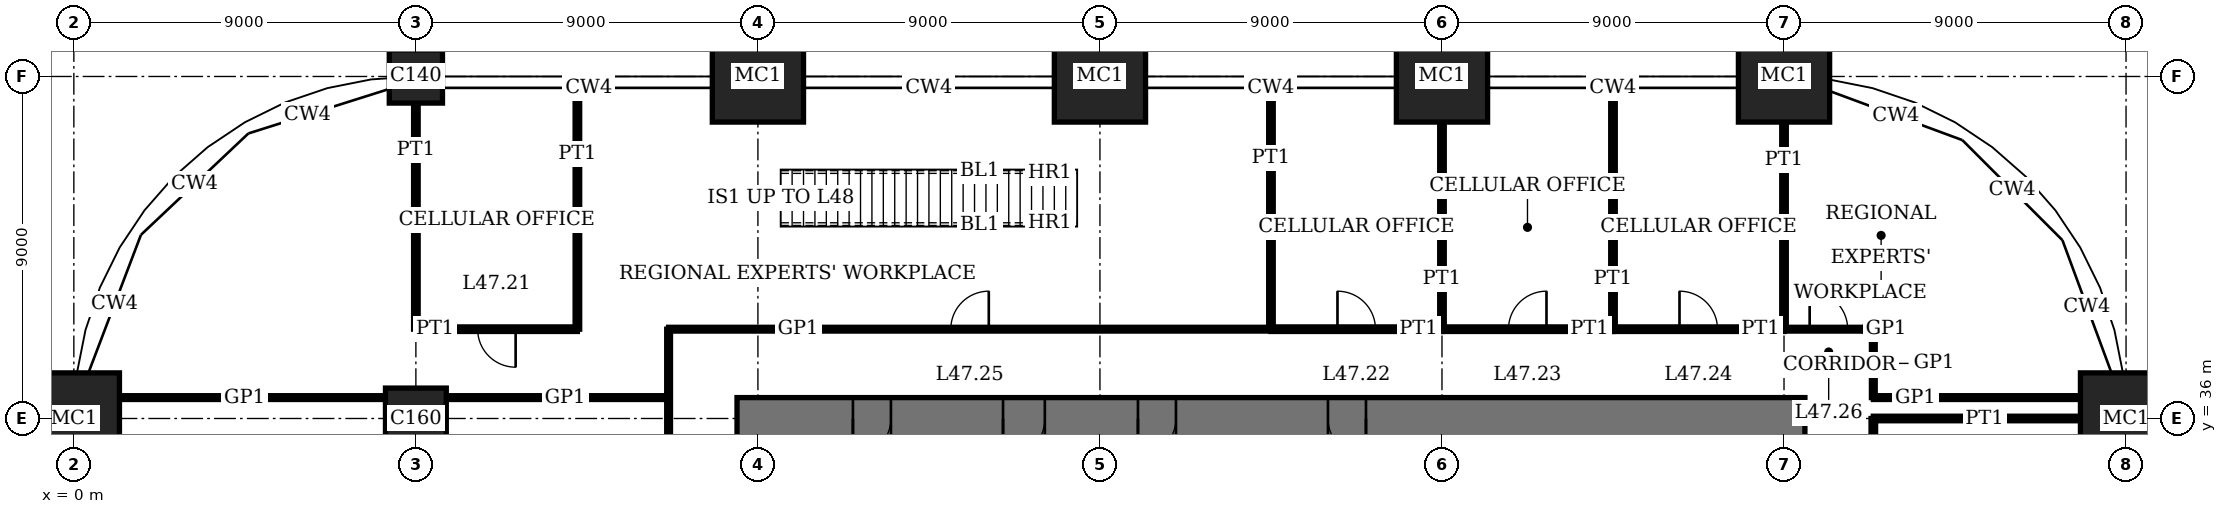
"""IFC4 building model, lengths in metres.
Left out: names, types, materials, properties, quantities, classifications, styles, units other than length and angle.
Written with IfcOpenShell. Run it as: python <this file> out.ifc"""

import sys

from ifc_helpers import new_model, si_unit, direction, frame, frame_2d, origin, origin_2d, place, context, subcontext, project, spatial, rectangle, extrude, element, fill, save


model = new_model("IFC4")
c1 = context("Model", 3, precision=1e-05, world=origin(), true_north=direction((0.0, 1.0)))
c2 = subcontext(c1, "Body", "Model", "MODEL_VIEW")
j1 = project(units=[si_unit("LENGTHUNIT", "METRE"), si_unit("PLANEANGLEUNIT", "RADIAN")], contexts=[c1])
p1 = place(None, origin())
s1 = spatial("IfcSite", under=j1, at=p1, CompositionType="ELEMENT")
p2 = place(p1, origin())
s2 = spatial("IfcBuilding", under=s1, at=p2, CompositionType="ELEMENT")
p3 = place(p2, frame((0.0, 0.0, 194.2)))
s3 = spatial("IfcBuildingStorey", under=s2, at=p3, CompositionType="ELEMENT", Elevation=194.2)
p4 = place(p3, frame((0.0, 36.0, 0.0), z_axis=(0.0, 0.0, 1.0), x_axis=(1.0, 0.0, 0.0)))
e1 = element("IfcColumn", 1, at=p4, inside=s3, PredefinedType="COLUMN", context=c2, shape_type="SweptSolid", body=[
    extrude(rectangle(XDim=2.4, YDim=2.4, at=origin_2d()), origin(), (0.0, 0.0, 1.0), 4.0),
])
p5 = place(p3, frame((9.0, 36.0, 0.0), z_axis=(0.0, 0.0, 1.0), x_axis=(1.0, 0.0, 0.0)))
e2 = element("IfcColumn", 2, at=p5, inside=s3, PredefinedType="COLUMN", context=c2, shape_type="SweptSolid", body=[
    extrude(rectangle(XDim=1.6, YDim=1.6, at=origin_2d()), origin(), (0.0, 0.0, 1.0), 4.0),
])
p6 = place(p3, frame((9.0, 45.0, 0.0), z_axis=(0.0, 0.0, 1.0), x_axis=(1.0, 0.0, 0.0)))
e3 = element("IfcColumn", 3, at=p6, inside=s3, PredefinedType="COLUMN", context=c2, shape_type="SweptSolid", body=[
    extrude(rectangle(XDim=1.4, YDim=1.4, at=origin_2d()), origin(), (0.0, 0.0, 1.0), 4.0),
])
for number, where, z_axis, x_axis in (
    (4, (18.0, 45.0, 0.0), (0.0, 0.0, 1.0), (1.0, 0.0, 0.0)),
    (5, (27.0, 45.0, 0.0), (0.0, 0.0, 1.0), (1.0, 0.0, 0.0)),
    (6, (36.0, 45.0, 0.0), (0.0, 0.0, 1.0), (1.0, 0.0, 0.0)),
    (7, (45.0, 45.0, 0.0), (0.0, 0.0, 1.0), (1.0, 0.0, 0.0)),
    (8, (54.0, 36.0, 0.0), (0.0, 0.0, 1.0), (1.0, 0.0, 0.0)),
):
    element("IfcColumn", number, at=place(p3, frame(where, z_axis=z_axis, x_axis=x_axis)), inside=s3, PredefinedType="COLUMN", context=c2, shape_type="SweptSolid", body=[
        extrude(rectangle(XDim=2.4, YDim=2.4, at=origin_2d()), origin(), (0.0, 0.0, 1.0), 4.0),
    ])
p7 = place(p3, frame((45.55, 36.0, 0.0), z_axis=(0.0, 0.0, 1.0), x_axis=(-1.0, 0.0, 0.0)))
e9 = element("IfcWall", 9, at=p7, inside=s3, PredefinedType="SHEAR", context=c2, shape_type="SweptSolid", body=[
    extrude(rectangle(XDim=28.1, YDim=1.1, at=frame_2d((14.05, 0.0))), origin(), (0.0, 0.0, 1.0), 4.0),
])
p8 = place(p7, frame((11.55, 0.0, 0.0)))
e10 = element("IfcOpeningElement", 10, at=p8, cuts=e9, PredefinedType="OPENING", context=c2, shape_type="SweptSolid", body=[
    extrude(rectangle(XDim=1.0, YDim=2.4, at=frame_2d((0.5, 1.2))), frame((0.0, 0.56, 0.0), z_axis=(0.0, -1.0, 0.0), x_axis=(1.0, 0.0, 0.0)), (0.0, 0.0, 1.0), 1.12),
])
p9 = place(p7, frame((16.55, 0.0, 0.0)))
e11 = element("IfcOpeningElement", 11, at=p9, cuts=e9, PredefinedType="OPENING", context=c2, shape_type="SweptSolid", body=[
    extrude(rectangle(XDim=1.0, YDim=2.4, at=frame_2d((0.5, 1.2))), frame((0.0, 0.56, 0.0), z_axis=(0.0, -1.0, 0.0), x_axis=(1.0, 0.0, 0.0)), (0.0, 0.0, 1.0), 1.12),
])
p10 = place(p7, frame((20.0, 0.0, 0.0)))
e12 = element("IfcOpeningElement", 12, at=p10, cuts=e9, PredefinedType="OPENING", context=c2, shape_type="SweptSolid", body=[
    extrude(rectangle(XDim=1.1, YDim=2.4, at=frame_2d((0.55, 1.2))), frame((0.0, 0.56, 0.0), z_axis=(0.0, -1.0, 0.0), x_axis=(1.0, 0.0, 0.0)), (0.0, 0.0, 1.0), 1.12),
])
p11 = place(p7, frame((24.05, 0.0, 0.0)))
e13 = element("IfcOpeningElement", 13, at=p11, cuts=e9, PredefinedType="OPENING", context=c2, shape_type="SweptSolid", body=[
    extrude(rectangle(XDim=1.0, YDim=2.4, at=frame_2d((0.5, 1.2))), frame((0.0, 0.56, 0.0), z_axis=(0.0, -1.0, 0.0), x_axis=(1.0, 0.0, 0.0)), (0.0, 0.0, 1.0), 1.12),
])
p12 = place(p3, frame((47.35, 36.0, 0.0), z_axis=(0.0, 0.0, 1.0), x_axis=(1.0, 0.0, 0.0)))
e14 = element("IfcWall", 14, at=p12, inside=s3, PredefinedType="PARTITIONING", context=c2, shape_type="SweptSolid", body=[
    extrude(rectangle(XDim=5.45, YDim=0.12, at=frame_2d((2.725, 0.0))), origin(), (0.0, 0.0, 1.0), 3.05),
])
p13 = place(p3, frame((1.2, 36.55, 0.0), z_axis=(0.0, 0.0, 1.0), x_axis=(1.0, 0.0, 0.0)))
e15 = element("IfcWall", 15, at=p13, inside=s3, PredefinedType="PARTITIONING", context=c2, shape_type="SweptSolid", body=[
    extrude(rectangle(XDim=7.0, YDim=0.1, at=frame_2d((3.5, 0.0))), origin(), (0.0, 0.0, 1.0), 3.75),
])
p14 = place(p3, frame((9.8, 36.55, 0.0), z_axis=(0.0, 0.0, 1.0), x_axis=(1.0, 0.0, 0.0)))
e16 = element("IfcWall", 16, at=p14, inside=s3, PredefinedType="PARTITIONING", context=c2, shape_type="SweptSolid", body=[
    extrude(rectangle(XDim=5.85, YDim=0.1, at=frame_2d((2.925, 0.0))), origin(), (0.0, 0.0, 1.0), 3.75),
])
p15 = place(p3, frame((47.35, 36.55, 0.0), z_axis=(0.0, 0.0, 1.0), x_axis=(1.0, 0.0, 0.0)))
e17 = element("IfcWall", 17, at=p15, inside=s3, PredefinedType="PARTITIONING", context=c2, shape_type="SweptSolid", body=[
    extrude(rectangle(XDim=5.45, YDim=0.1, at=frame_2d((2.725, 0.0))), origin(), (0.0, 0.0, 1.0), 3.75),
])
p16 = place(p3, frame((9.0, 38.35, 0.0), z_axis=(0.0, 0.0, 1.0), x_axis=(1.0, 0.0, 0.0)))
e18 = element("IfcWall", 18, at=p16, inside=s3, PredefinedType="PARTITIONING", context=c2, shape_type="SweptSolid", body=[
    extrude(rectangle(XDim=4.25, YDim=0.12, at=frame_2d((2.125, 0.0))), origin(), (0.0, 0.0, 1.0), 3.75),
])
p17 = place(p16, frame((1.625, 0.0, 0.0)))
e19 = element("IfcOpeningElement", 19, at=p17, cuts=e18, PredefinedType="OPENING", context=c2, shape_type="SweptSolid", body=[
    extrude(rectangle(XDim=1.0, YDim=2.4, at=frame_2d((0.5, 1.2))), frame((0.0, 0.07, 0.0), z_axis=(0.0, -1.0, 0.0), x_axis=(1.0, 0.0, 0.0)), (0.0, 0.0, 1.0), 0.14),
])
p18 = place(p3, frame((31.5, 38.35, 0.0), z_axis=(0.0, 0.0, 1.0), x_axis=(1.0, 0.0, 0.0)))
e20 = element("IfcWall", 20, at=p18, inside=s3, PredefinedType="PARTITIONING", context=c2, shape_type="SweptSolid", body=[
    extrude(rectangle(XDim=4.5, YDim=0.12, at=frame_2d((2.25, 0.0))), origin(), (0.0, 0.0, 1.0), 3.75),
])
p19 = place(p18, frame((1.75, 0.0, 0.0)))
e21 = element("IfcOpeningElement", 21, at=p19, cuts=e20, PredefinedType="OPENING", context=c2, shape_type="SweptSolid", body=[
    extrude(rectangle(XDim=1.0, YDim=2.4, at=frame_2d((0.5, 1.2))), frame((0.0, 0.07, 0.0), z_axis=(0.0, -1.0, 0.0), x_axis=(1.0, 0.0, 0.0)), (0.0, 0.0, 1.0), 0.14),
])
p20 = place(p3, frame((36.0, 38.35, 0.0), z_axis=(0.0, 0.0, 1.0), x_axis=(1.0, 0.0, 0.0)))
e22 = element("IfcWall", 22, at=p20, inside=s3, PredefinedType="PARTITIONING", context=c2, shape_type="SweptSolid", body=[
    extrude(rectangle(XDim=4.5, YDim=0.12, at=frame_2d((2.25, 0.0))), origin(), (0.0, 0.0, 1.0), 3.75),
])
p21 = place(p20, frame((1.75, 0.0, 0.0)))
e23 = element("IfcOpeningElement", 23, at=p21, cuts=e22, PredefinedType="OPENING", context=c2, shape_type="SweptSolid", body=[
    extrude(rectangle(XDim=1.0, YDim=2.4, at=frame_2d((0.5, 1.2))), frame((0.0, 0.07, 0.0), z_axis=(0.0, -1.0, 0.0), x_axis=(1.0, 0.0, 0.0)), (0.0, 0.0, 1.0), 0.14),
])
p22 = place(p3, frame((40.5, 38.35, 0.0), z_axis=(0.0, 0.0, 1.0), x_axis=(1.0, 0.0, 0.0)))
e24 = element("IfcWall", 24, at=p22, inside=s3, PredefinedType="PARTITIONING", context=c2, shape_type="SweptSolid", body=[
    extrude(rectangle(XDim=4.5, YDim=0.12, at=frame_2d((2.25, 0.0))), origin(), (0.0, 0.0, 1.0), 3.75),
])
p23 = place(p22, frame((1.75, 0.0, 0.0)))
e25 = element("IfcOpeningElement", 25, at=p23, cuts=e24, PredefinedType="OPENING", context=c2, shape_type="SweptSolid", body=[
    extrude(rectangle(XDim=1.0, YDim=2.4, at=frame_2d((0.5, 1.2))), frame((0.0, 0.07, 0.0), z_axis=(0.0, -1.0, 0.0), x_axis=(1.0, 0.0, 0.0)), (0.0, 0.0, 1.0), 0.14),
])
p24 = place(p3, frame((15.65, 38.35, 0.0), z_axis=(0.0, 0.0, 1.0), x_axis=(1.0, 0.0, 0.0)))
e26 = element("IfcWall", 26, at=p24, inside=s3, PredefinedType="PARTITIONING", context=c2, shape_type="SweptSolid", body=[
    extrude(rectangle(XDim=15.85, YDim=0.1, at=frame_2d((7.925, 0.0))), origin(), (0.0, 0.0, 1.0), 3.75),
])
p25 = place(p24, frame((7.425, 0.0, 0.0)))
e27 = element("IfcOpeningElement", 27, at=p25, cuts=e26, PredefinedType="OPENING", context=c2, shape_type="SweptSolid", body=[
    extrude(rectangle(XDim=1.0, YDim=2.4, at=frame_2d((0.5, 1.2))), frame((0.0, 0.06, 0.0), z_axis=(0.0, -1.0, 0.0), x_axis=(1.0, 0.0, 0.0)), (0.0, 0.0, 1.0), 0.12),
])
p26 = place(p3, frame((45.0, 38.35, 0.0), z_axis=(0.0, 0.0, 1.0), x_axis=(1.0, 0.0, 0.0)))
e28 = element("IfcWall", 28, at=p26, inside=s3, PredefinedType="PARTITIONING", context=c2, shape_type="SweptSolid", body=[
    extrude(rectangle(XDim=2.35, YDim=0.1, at=frame_2d((1.175, 0.0))), origin(), (0.0, 0.0, 1.0), 3.75),
])
p27 = place(p26, frame((0.675, 0.0, 0.0)))
e29 = element("IfcOpeningElement", 29, at=p27, cuts=e28, PredefinedType="OPENING", context=c2, shape_type="SweptSolid", body=[
    extrude(rectangle(XDim=1.0, YDim=2.4, at=frame_2d((0.5, 1.2))), frame((0.0, 0.06, 0.0), z_axis=(0.0, -1.0, 0.0), x_axis=(1.0, 0.0, 0.0)), (0.0, 0.0, 1.0), 0.12),
])
p28 = place(p3, frame((9.0, 38.35, 0.0), z_axis=(0.0, 0.0, 1.0), x_axis=(0.0, 1.0, 0.0)))
e30 = element("IfcWall", 30, at=p28, inside=s3, PredefinedType="PARTITIONING", context=c2, shape_type="SweptSolid", body=[
    extrude(rectangle(XDim=5.95, YDim=0.12, at=frame_2d((2.975, 0.0))), origin(), (0.0, 0.0, 1.0), 3.05),
])
p29 = place(p3, frame((13.25, 38.35, 0.0), z_axis=(0.0, 0.0, 1.0), x_axis=(0.0, 1.0, 0.0)))
e31 = element("IfcWall", 31, at=p29, inside=s3, PredefinedType="PARTITIONING", context=c2, shape_type="SweptSolid", body=[
    extrude(rectangle(XDim=6.34, YDim=0.12, at=frame_2d((3.17, 0.0))), origin(), (0.0, 0.0, 1.0), 3.75),
])
p30 = place(p3, frame((15.65, 31.5, 0.0), z_axis=(0.0, 0.0, 1.0), x_axis=(0.0, 1.0, 0.0)))
e32 = element("IfcWall", 32, at=p30, inside=s3, PredefinedType="PARTITIONING", context=c2, shape_type="SweptSolid", body=[
    extrude(rectangle(XDim=6.85, YDim=0.1, at=frame_2d((3.425, 0.0))), origin(), (0.0, 0.0, 1.0), 3.75),
])
p31 = place(p3, frame((31.5, 38.35, 0.0), z_axis=(0.0, 0.0, 1.0), x_axis=(0.0, 1.0, 0.0)))
e33 = element("IfcWall", 33, at=p31, inside=s3, PredefinedType="PARTITIONING", context=c2, shape_type="SweptSolid", body=[
    extrude(rectangle(XDim=6.34, YDim=0.12, at=frame_2d((3.17, 0.0))), origin(), (0.0, 0.0, 1.0), 3.75),
])
p32 = place(p3, frame((36.0, 38.35, 0.0), z_axis=(0.0, 0.0, 1.0), x_axis=(0.0, 1.0, 0.0)))
e34 = element("IfcWall", 34, at=p32, inside=s3, PredefinedType="PARTITIONING", context=c2, shape_type="SweptSolid", body=[
    extrude(rectangle(XDim=5.45, YDim=0.12, at=frame_2d((2.725, 0.0))), origin(), (0.0, 0.0, 1.0), 3.05),
])
p33 = place(p3, frame((40.5, 38.35, 0.0), z_axis=(0.0, 0.0, 1.0), x_axis=(0.0, 1.0, 0.0)))
e35 = element("IfcWall", 35, at=p33, inside=s3, PredefinedType="PARTITIONING", context=c2, shape_type="SweptSolid", body=[
    extrude(rectangle(XDim=6.34, YDim=0.12, at=frame_2d((3.17, 0.0))), origin(), (0.0, 0.0, 1.0), 3.75),
])
p34 = place(p3, frame((45.0, 38.35, 0.0), z_axis=(0.0, 0.0, 1.0), x_axis=(0.0, 1.0, 0.0)))
e36 = element("IfcWall", 36, at=p34, inside=s3, PredefinedType="PARTITIONING", context=c2, shape_type="SweptSolid", body=[
    extrude(rectangle(XDim=5.45, YDim=0.12, at=frame_2d((2.725, 0.0))), origin(), (0.0, 0.0, 1.0), 3.05),
])
p35 = place(p3, frame((47.35, 27.0, 0.0), z_axis=(0.0, 0.0, 1.0), x_axis=(0.0, 1.0, 0.0)))
e37 = element("IfcWall", 37, at=p35, inside=s3, PredefinedType="PARTITIONING", context=c2, shape_type="SweptSolid", body=[
    extrude(rectangle(XDim=9.0, YDim=0.12, at=frame_2d((4.5, 0.0))), origin(), (0.0, 0.0, 1.0), 3.75),
])
p36 = place(p35, frame((4.0, 0.0, 0.0)))
e38 = element("IfcOpeningElement", 38, at=p36, cuts=e37, PredefinedType="OPENING", context=c2, shape_type="SweptSolid", body=[
    extrude(rectangle(XDim=1.0, YDim=2.4, at=frame_2d((0.5, 1.2))), frame((0.0, 0.07, 0.0), z_axis=(0.0, -1.0, 0.0), x_axis=(1.0, 0.0, 0.0)), (0.0, 0.0, 1.0), 0.14),
])
p37 = place(p3, frame((47.35, 36.55, 0.0), z_axis=(0.0, 0.0, 1.0), x_axis=(0.0, 1.0, 0.0)))
e39 = element("IfcWall", 39, at=p37, inside=s3, PredefinedType="PARTITIONING", context=c2, shape_type="SweptSolid", body=[
    extrude(rectangle(XDim=1.8, YDim=0.1, at=frame_2d((0.9, 0.0))), origin(), (0.0, 0.0, 1.0), 3.75),
])
p38 = place(p8, origin())
e40 = element("IfcDoor", 40, at=p38, inside=s3, OperationType="SINGLE_SWING_RIGHT", PredefinedType="DOOR", context=c2, shape_type="SweptSolid", body=[
    extrude(rectangle(XDim=1.0, YDim=2.4, at=frame_2d((0.5, 1.2))), frame((0.0, 0.025, 0.0), z_axis=(0.0, -1.0, 0.0), x_axis=(1.0, 0.0, 0.0)), (0.0, 0.0, 1.0), 0.05),
    extrude(rectangle(XDim=0.04, YDim=2.4, at=frame_2d((0.02, 1.2))), frame((0.0, 0.4, 0.0), z_axis=(0.0, -1.0, 0.0), x_axis=(1.0, 0.0, 0.0)), (0.0, 0.0, 1.0), 0.8),
    extrude(rectangle(XDim=0.04, YDim=2.4, at=frame_2d((0.98, 1.2))), frame((0.0, 0.4, 0.0), z_axis=(0.0, -1.0, 0.0), x_axis=(1.0, 0.0, 0.0)), (0.0, 0.0, 1.0), 0.8),
    extrude(rectangle(XDim=1.0, YDim=0.04, at=frame_2d((0.5, 2.38))), frame((0.0, 0.4, 0.0), z_axis=(0.0, -1.0, 0.0), x_axis=(1.0, 0.0, 0.0)), (0.0, 0.0, 1.0), 0.8),
])
fill(e10, e40)
p39 = place(p9, origin())
e41 = element("IfcDoor", 41, at=p39, inside=s3, OperationType="SINGLE_SWING_LEFT", PredefinedType="DOOR", context=c2, shape_type="SweptSolid", body=[
    extrude(rectangle(XDim=1.0, YDim=2.4, at=frame_2d((0.5, 1.2))), frame((0.0, 0.025, 0.0), z_axis=(0.0, -1.0, 0.0), x_axis=(1.0, 0.0, 0.0)), (0.0, 0.0, 1.0), 0.05),
    extrude(rectangle(XDim=0.04, YDim=2.4, at=frame_2d((0.02, 1.2))), frame((0.0, 0.4, 0.0), z_axis=(0.0, -1.0, 0.0), x_axis=(1.0, 0.0, 0.0)), (0.0, 0.0, 1.0), 0.8),
    extrude(rectangle(XDim=0.04, YDim=2.4, at=frame_2d((0.98, 1.2))), frame((0.0, 0.4, 0.0), z_axis=(0.0, -1.0, 0.0), x_axis=(1.0, 0.0, 0.0)), (0.0, 0.0, 1.0), 0.8),
    extrude(rectangle(XDim=1.0, YDim=0.04, at=frame_2d((0.5, 2.38))), frame((0.0, 0.4, 0.0), z_axis=(0.0, -1.0, 0.0), x_axis=(1.0, 0.0, 0.0)), (0.0, 0.0, 1.0), 0.8),
])
fill(e11, e41)
p40 = place(p10, origin())
e42 = element("IfcDoor", 42, at=p40, inside=s3, OperationType="SINGLE_SWING_LEFT", PredefinedType="DOOR", context=c2, shape_type="SweptSolid", body=[
    extrude(rectangle(XDim=1.1, YDim=2.4, at=frame_2d((0.55, 1.2))), frame((0.0, 0.025, 0.0), z_axis=(0.0, -1.0, 0.0), x_axis=(1.0, 0.0, 0.0)), (0.0, 0.0, 1.0), 0.05),
    extrude(rectangle(XDim=0.04, YDim=2.4, at=frame_2d((0.02, 1.2))), frame((0.0, 0.44, 0.0), z_axis=(0.0, -1.0, 0.0), x_axis=(1.0, 0.0, 0.0)), (0.0, 0.0, 1.0), 0.88),
    extrude(rectangle(XDim=0.04, YDim=2.4, at=frame_2d((1.08, 1.2))), frame((0.0, 0.44, 0.0), z_axis=(0.0, -1.0, 0.0), x_axis=(1.0, 0.0, 0.0)), (0.0, 0.0, 1.0), 0.88),
    extrude(rectangle(XDim=1.1, YDim=0.04, at=frame_2d((0.55, 2.38))), frame((0.0, 0.44, 0.0), z_axis=(0.0, -1.0, 0.0), x_axis=(1.0, 0.0, 0.0)), (0.0, 0.0, 1.0), 0.88),
])
fill(e12, e42)
p41 = place(p11, origin())
e43 = element("IfcDoor", 43, at=p41, inside=s3, OperationType="SINGLE_SWING_LEFT", PredefinedType="DOOR", context=c2, shape_type="SweptSolid", body=[
    extrude(rectangle(XDim=1.0, YDim=2.4, at=frame_2d((0.5, 1.2))), frame((0.0, 0.025, 0.0), z_axis=(0.0, -1.0, 0.0), x_axis=(1.0, 0.0, 0.0)), (0.0, 0.0, 1.0), 0.05),
    extrude(rectangle(XDim=0.04, YDim=2.4, at=frame_2d((0.02, 1.2))), frame((0.0, 0.4, 0.0), z_axis=(0.0, -1.0, 0.0), x_axis=(1.0, 0.0, 0.0)), (0.0, 0.0, 1.0), 0.8),
    extrude(rectangle(XDim=0.04, YDim=2.4, at=frame_2d((0.98, 1.2))), frame((0.0, 0.4, 0.0), z_axis=(0.0, -1.0, 0.0), x_axis=(1.0, 0.0, 0.0)), (0.0, 0.0, 1.0), 0.8),
    extrude(rectangle(XDim=1.0, YDim=0.04, at=frame_2d((0.5, 2.38))), frame((0.0, 0.4, 0.0), z_axis=(0.0, -1.0, 0.0), x_axis=(1.0, 0.0, 0.0)), (0.0, 0.0, 1.0), 0.8),
])
fill(e13, e43)
p42 = place(p17, origin())
e44 = element("IfcDoor", 44, at=p42, inside=s3, OperationType="SINGLE_SWING_RIGHT", PredefinedType="DOOR", context=c2, shape_type="SweptSolid", body=[
    extrude(rectangle(XDim=1.0, YDim=2.4, at=frame_2d((0.5, 1.2))), frame((0.0, 0.025, 0.0), z_axis=(0.0, -1.0, 0.0), x_axis=(1.0, 0.0, 0.0)), (0.0, 0.0, 1.0), 0.05),
])
fill(e19, e44)
p43 = place(p19, origin())
e45 = element("IfcDoor", 45, at=p43, inside=s3, OperationType="SINGLE_SWING_RIGHT", PredefinedType="DOOR", context=c2, shape_type="SweptSolid", body=[
    extrude(rectangle(XDim=1.0, YDim=2.4, at=frame_2d((0.5, 1.2))), frame((0.0, 0.025, 0.0), z_axis=(0.0, -1.0, 0.0), x_axis=(1.0, 0.0, 0.0)), (0.0, 0.0, 1.0), 0.05),
])
fill(e21, e45)
p44 = place(p21, origin())
e46 = element("IfcDoor", 46, at=p44, inside=s3, OperationType="SINGLE_SWING_LEFT", PredefinedType="DOOR", context=c2, shape_type="SweptSolid", body=[
    extrude(rectangle(XDim=1.0, YDim=2.4, at=frame_2d((0.5, 1.2))), frame((0.0, 0.025, 0.0), z_axis=(0.0, -1.0, 0.0), x_axis=(1.0, 0.0, 0.0)), (0.0, 0.0, 1.0), 0.05),
])
fill(e23, e46)
p45 = place(p23, origin())
e47 = element("IfcDoor", 47, at=p45, inside=s3, OperationType="SINGLE_SWING_RIGHT", PredefinedType="DOOR", context=c2, shape_type="SweptSolid", body=[
    extrude(rectangle(XDim=1.0, YDim=2.4, at=frame_2d((0.5, 1.2))), frame((0.0, 0.025, 0.0), z_axis=(0.0, -1.0, 0.0), x_axis=(1.0, 0.0, 0.0)), (0.0, 0.0, 1.0), 0.05),
])
fill(e25, e47)
p46 = place(p25, origin())
e48 = element("IfcDoor", 48, at=p46, inside=s3, OperationType="SINGLE_SWING_LEFT", PredefinedType="DOOR", context=c2, shape_type="SweptSolid", body=[
    extrude(rectangle(XDim=1.0, YDim=2.4, at=frame_2d((0.5, 1.2))), frame((0.0, 0.02, 0.0), z_axis=(0.0, -1.0, 0.0), x_axis=(1.0, 0.0, 0.0)), (0.0, 0.0, 1.0), 0.04),
])
fill(e27, e48)
p47 = place(p27, origin())
e49 = element("IfcDoor", 49, at=p47, inside=s3, OperationType="SINGLE_SWING_RIGHT", PredefinedType="DOOR", context=c2, shape_type="SweptSolid", body=[
    extrude(rectangle(XDim=1.0, YDim=2.4, at=frame_2d((0.5, 1.2))), frame((0.0, 0.02, 0.0), z_axis=(0.0, -1.0, 0.0), x_axis=(1.0, 0.0, 0.0)), (0.0, 0.0, 1.0), 0.04),
])
fill(e29, e49)
save(model, sys.argv[1])
